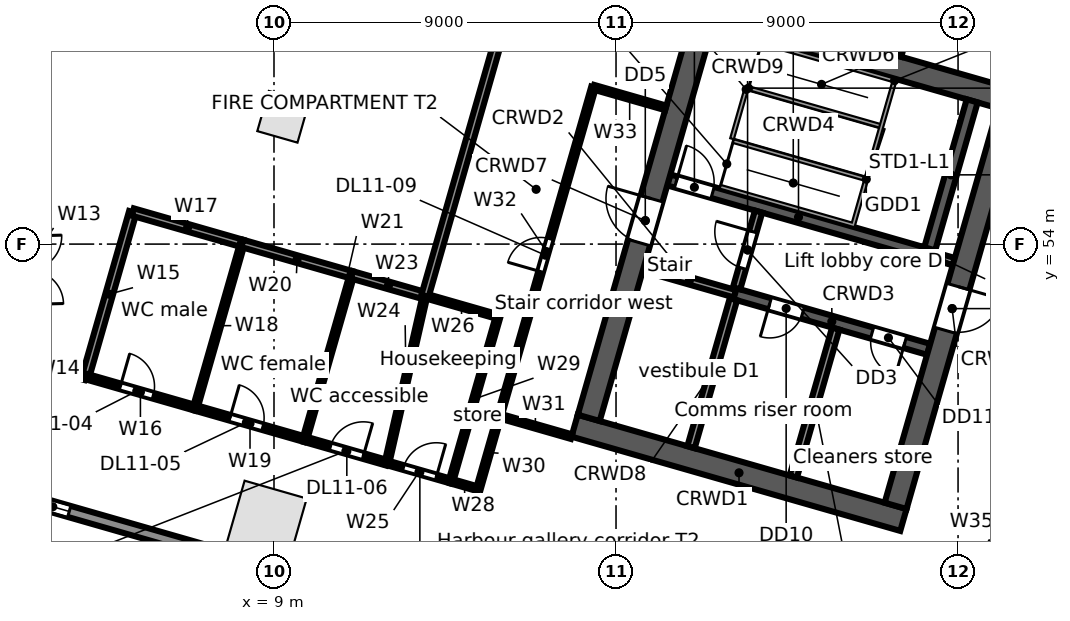
"""IFC4 building model, lengths in metres.
Left out: names, types, materials, properties, quantities, classifications, styles, units other than length and angle.
Written with IfcOpenShell. Run it as: python <this file> out.ifc"""

import sys

from ifc_helpers import new_model, si_unit, direction, frame, frame_2d, origin, origin_2d, place, context, subcontext, project, spatial, rectangle, extrude, element, fill, save


model = new_model("IFC4")
c1 = context("Model", 3, precision=1e-05, world=origin(), true_north=direction((0.0, 1.0)))
c2 = subcontext(c1, "Body", "Model", "MODEL_VIEW")
j1 = project(units=[si_unit("LENGTHUNIT", "METRE"), si_unit("PLANEANGLEUNIT", "RADIAN")], contexts=[c1])
p1 = place(None, origin())
s1 = spatial("IfcSite", under=j1, at=p1, CompositionType="ELEMENT")
p2 = place(p1, origin())
s2 = spatial("IfcBuilding", under=s1, at=p2, CompositionType="ELEMENT")
p3 = place(p2, frame((0.0, 0.0, 66.5)))
s3 = spatial("IfcBuildingStorey", under=s2, at=p3, CompositionType="ELEMENT", Elevation=66.5)
p4 = place(p3, frame((8.81, 46.722, 0.0), z_axis=(0.0, 0.0, 1.0), x_axis=(0.961261695938, -0.275637355817, 0.0)))
e1 = element("IfcColumn", 1, at=p4, inside=s3, PredefinedType="COLUMN", context=c2, shape_type="SweptSolid", body=[
    extrude(rectangle(XDim=1.7, YDim=1.7, at=origin_2d()), origin(), (0.0, 0.0, 1.0), 5.0),
])
p5 = place(p3, frame((9.241, 57.35, 0.0), z_axis=(0.0, 0.0, 1.0), x_axis=(0.961261695938, -0.275637355817, 0.0)))
e2 = element("IfcColumn", 2, at=p5, inside=s3, PredefinedType="COLUMN", context=c2, shape_type="SweptSolid", body=[
    extrude(rectangle(XDim=1.1, YDim=1.1, at=origin_2d()), origin(), (0.0, 0.0, 1.0), 5.0),
])
p6 = place(p3, frame((25.398, 40.717, 0.0), z_axis=(0.0, 0.0, 1.0), x_axis=(-0.961262423262, 0.275634819324, 0.0)))
e3 = element("IfcWall", 3, at=p6, inside=s3, PredefinedType="STANDARD", context=c2, shape_type="SweptSolid", body=[
    extrude(rectangle(XDim=26.359, YDim=0.3, at=frame_2d((13.179, 0.0))), origin(), (0.0, 0.0, 1.0), 4.68),
])
p7 = place(p6, frame((22.664, 0.0, 0.6)))
e4 = element("IfcOpeningElement", 4, at=p7, cuts=e3, PredefinedType="OPENING", context=c2, shape_type="SweptSolid", body=[
    extrude(rectangle(XDim=0.9, YDim=3.2, at=frame_2d((0.45, 1.6))), frame((0.0, 0.16, 0.0), z_axis=(0.0, -1.0, 0.0), x_axis=(1.0, 0.0, 0.0)), (0.0, 0.0, 1.0), 0.32),
])
p8 = place(p6, frame((13.844, 0.0, 0.6)))
e5 = element("IfcOpeningElement", 5, at=p8, cuts=e3, PredefinedType="OPENING", context=c2, shape_type="SweptSolid", body=[
    extrude(rectangle(XDim=0.9, YDim=3.2, at=frame_2d((0.45, 1.6))), frame((0.0, 0.16, 0.0), z_axis=(0.0, -1.0, 0.0), x_axis=(1.0, 0.0, 0.0)), (0.0, 0.0, 1.0), 0.32),
])
p9 = place(p6, frame((5.023, 0.0, 0.6)))
e6 = element("IfcOpeningElement", 6, at=p9, cuts=e3, PredefinedType="OPENING", context=c2, shape_type="SweptSolid", body=[
    extrude(rectangle(XDim=0.9, YDim=3.2, at=frame_2d((0.45, 1.6))), frame((0.0, 0.16, 0.0), z_axis=(0.0, -1.0, 0.0), x_axis=(1.0, 0.0, 0.0)), (0.0, 0.0, 1.0), 0.32),
])
p10 = place(p3, frame((16.911, 49.221, 0.0), z_axis=(0.0, 0.0, 1.0), x_axis=(0.96126248289, -0.275634611374, 0.0)))
e7 = element("IfcWall", 7, at=p10, inside=s3, PredefinedType="SOLIDWALL", context=c2, shape_type="SweptSolid", body=[
    extrude(rectangle(XDim=9.0, YDim=0.6, at=frame_2d((4.5, 0.0))), origin(), (0.0, 0.0, 1.0), 4.68),
])
p11 = place(p3, frame((18.728, 53.382, 0.0), z_axis=(0.0, 0.0, 1.0), x_axis=(0.961247070632, -0.275688355216, 0.0)))
e8 = element("IfcWall", 8, at=p11, inside=s3, PredefinedType="SOLIDWALL", context=c2, shape_type="SweptSolid", body=[
    extrude(rectangle(XDim=2.5, YDim=0.2, at=frame_2d((1.25, 0.0))), origin(), (0.0, 0.0, 1.0), 4.68),
])
p12 = place(p3, frame((21.131, 52.692, 0.0), z_axis=(0.0, 0.0, 1.0), x_axis=(0.961271492568, -0.275603188616, 0.0)))
e9 = element("IfcWall", 9, at=p12, inside=s3, PredefinedType="SOLIDWALL", context=c2, shape_type="SweptSolid", body=[
    extrude(rectangle(XDim=5.3, YDim=0.3, at=frame_2d((2.65, 0.0))), origin(), (0.0, 0.0, 1.0), 4.68),
])
p13 = place(p12, frame((0.95, 0.0, 0.0)))
e10 = element("IfcOpeningElement", 10, at=p13, cuts=e9, PredefinedType="OPENING", context=c2, shape_type="SweptSolid", body=[
    extrude(rectangle(XDim=0.9, YDim=2.1, at=frame_2d((0.45, 1.05))), frame((0.0, 0.16, 0.0), z_axis=(0.0, -1.0, 0.0), x_axis=(1.0, 0.0, 0.0)), (0.0, 0.0, 1.0), 0.32),
])
p14 = place(p12, frame((3.75, 0.0, 0.0)))
e11 = element("IfcOpeningElement", 11, at=p14, cuts=e9, PredefinedType="OPENING", context=c2, shape_type="SweptSolid", body=[
    extrude(rectangle(XDim=0.9, YDim=2.1, at=frame_2d((0.45, 1.05))), frame((0.0, 0.16, 0.0), z_axis=(0.0, -1.0, 0.0), x_axis=(1.0, 0.0, 0.0)), (0.0, 0.0, 1.0), 0.32),
])
p15 = place(p3, frame((19.389, 55.689, 0.0), z_axis=(0.0, 0.0, 1.0), x_axis=(0.961261397636, -0.275638396117, 0.0)))
e12 = element("IfcWall", 12, at=p15, inside=s3, PredefinedType="SOLIDWALL", context=c2, shape_type="SweptSolid", body=[
    extrude(rectangle(XDim=7.1, YDim=0.3, at=frame_2d((3.55, 0.0))), origin(), (0.0, 0.0, 1.0), 4.68),
])
p16 = place(p15, frame((0.2, 0.0, 0.0)))
e13 = element("IfcOpeningElement", 13, at=p16, cuts=e12, PredefinedType="OPENING", context=c2, shape_type="SweptSolid", body=[
    extrude(rectangle(XDim=1.0, YDim=2.1, at=frame_2d((0.5, 1.05))), frame((0.0, 0.16, 0.0), z_axis=(0.0, -1.0, 0.0), x_axis=(1.0, 0.0, 0.0)), (0.0, 0.0, 1.0), 0.32),
])
p17 = place(p3, frame((26.214, 53.732, 0.0), z_axis=(0.0, 0.0, 1.0), x_axis=(0.96122076476, -0.27578005982, 0.0)))
e14 = element("IfcWall", 14, at=p17, inside=s3, PredefinedType="SOLIDWALL", context=c2, shape_type="SweptSolid", body=[
    extrude(rectangle(XDim=0.7, YDim=0.2, at=frame_2d((0.35, 0.0))), origin(), (0.0, 0.0, 1.0), 4.68),
])
p18 = place(p3, frame((20.053, 60.18, 0.0), z_axis=(0.0, 0.0, 1.0), x_axis=(0.96126248289, -0.275634611374, 0.0)))
e15 = element("IfcWall", 15, at=p18, inside=s3, PredefinedType="SOLIDWALL", context=c2, shape_type="SweptSolid", body=[
    extrude(rectangle(XDim=9.0, YDim=0.6, at=frame_2d((4.5, 0.0))), origin(), (0.0, 0.0, 1.0), 4.68),
])
p19 = place(p3, frame((17.282, 49.427, 0.0), z_axis=(0.0, 0.0, 1.0), x_axis=(0.275631631629, 0.961263337304, 0.0)))
e16 = element("IfcWall", 16, at=p19, inside=s3, PredefinedType="SOLIDWALL", context=c2, shape_type="SweptSolid", body=[
    extrude(rectangle(XDim=10.8, YDim=0.6, at=frame_2d((5.4, 0.0))), origin(), (0.0, 0.0, 1.0), 4.68),
])
p20 = place(p19, frame((4.8, 0.0, 0.0)))
e17 = element("IfcOpeningElement", 17, at=p20, cuts=e16, PredefinedType="OPENING", context=c2, shape_type="SweptSolid", body=[
    extrude(rectangle(XDim=1.2, YDim=2.1, at=frame_2d((0.6, 1.05))), frame((0.0, 0.31, 0.0), z_axis=(0.0, -1.0, 0.0), x_axis=(1.0, 0.0, 0.0)), (0.0, 0.0, 1.0), 0.62),
])
p21 = place(p3, frame((19.973, 48.655, 0.0), z_axis=(0.0, 0.0, 1.0), x_axis=(0.275668441653, 0.961252781674, 0.0)))
e18 = element("IfcWall", 18, at=p21, inside=s3, PredefinedType="SOLIDWALL", context=c2, shape_type="SweptSolid", body=[
    extrude(rectangle(XDim=4.05, YDim=0.2, at=frame_2d((2.025, 0.0))), origin(), (0.0, 0.0, 1.0), 4.68),
])
p22 = place(p3, frame((21.172, 52.837, 0.0), z_axis=(0.0, 0.0, 1.0), x_axis=(0.275657676022, 0.961255868981, 0.0)))
e19 = element("IfcWall", 19, at=p22, inside=s3, PredefinedType="PARTITIONING", context=c2, shape_type="SweptSolid", body=[
    extrude(rectangle(XDim=2.1, YDim=0.2, at=frame_2d((1.05, 0.0))), origin(), (0.0, 0.0, 1.0), 4.68),
])
p23 = place(p22, frame((0.55, 0.0, 0.0)))
e20 = element("IfcOpeningElement", 20, at=p23, cuts=e19, PredefinedType="OPENING", context=c2, shape_type="SweptSolid", body=[
    extrude(rectangle(XDim=1.0, YDim=2.1, at=frame_2d((0.5, 1.05))), frame((0.0, 0.11, 0.0), z_axis=(0.0, -1.0, 0.0), x_axis=(1.0, 0.0, 0.0)), (0.0, 0.0, 1.0), 0.22),
])
p24 = place(p3, frame((22.665, 47.883, 0.0), z_axis=(0.0, 0.0, 1.0), x_axis=(0.275596769212, 0.961273333033, 0.0)))
e21 = element("IfcWall", 21, at=p24, inside=s3, PredefinedType="PARTITIONING", context=c2, shape_type="SweptSolid", body=[
    extrude(rectangle(XDim=4.05, YDim=0.2, at=frame_2d((2.025, 0.0))), origin(), (0.0, 0.0, 1.0), 4.68),
])
p25 = place(p3, frame((26.256, 53.876, 0.0), z_axis=(0.0, 0.0, 1.0), x_axis=(0.275612739511, 0.961268754209, 0.0)))
e22 = element("IfcWall", 22, at=p25, inside=s3, PredefinedType="SOLIDWALL", context=c2, shape_type="SweptSolid", body=[
    extrude(rectangle(XDim=4.05, YDim=0.3, at=frame_2d((2.025, 0.0))), origin(), (0.0, 0.0, 1.0), 4.68),
])
p26 = place(p3, frame((25.356, 47.112, 0.0), z_axis=(0.0, 0.0, 1.0), x_axis=(0.275631631629, 0.961263337304, 0.0)))
e23 = element("IfcWall", 23, at=p26, inside=s3, PredefinedType="SOLIDWALL", context=c2, shape_type="SweptSolid", body=[
    extrude(rectangle(XDim=10.8, YDim=0.6, at=frame_2d((5.4, 0.0))), origin(), (0.0, 0.0, 1.0), 4.68),
])
p27 = place(p26, frame((4.8, 0.0, 0.0)))
e24 = element("IfcOpeningElement", 24, at=p27, cuts=e23, PredefinedType="OPENING", context=c2, shape_type="SweptSolid", body=[
    extrude(rectangle(XDim=1.2, YDim=2.1, at=frame_2d((0.6, 1.05))), frame((0.0, 0.31, 0.0), z_axis=(0.0, -1.0, 0.0), x_axis=(1.0, 0.0, 0.0)), (0.0, 0.0, 1.0), 0.62),
])
p28 = place(p3, frame((2.601, 50.932, 0.0), z_axis=(0.0, 0.0, 1.0), x_axis=(0.961197773994, -0.27586018065, 0.0)))
e25 = element("IfcWall", 25, at=p28, inside=s3, PredefinedType="PARTITIONING", context=c2, shape_type="SweptSolid", body=[
    extrude(rectangle(XDim=1.5, YDim=0.2, at=frame_2d((0.75, 0.0))), origin(), (0.0, 0.0, 1.0), 4.68),
])
p29 = place(p3, frame((4.043, 50.518, 0.0), z_axis=(0.0, 0.0, 1.0), x_axis=(0.275745553681, 0.96123066411, 0.0)))
e26 = element("IfcWall", 26, at=p29, inside=s3, PredefinedType="PARTITIONING", context=c2, shape_type="SweptSolid", body=[
    extrude(rectangle(XDim=4.5, YDim=0.2, at=frame_2d((2.25, 0.0))), origin(), (0.0, 0.0, 1.0), 4.68),
])
p30 = place(p3, frame((4.043, 50.518, 0.0), z_axis=(0.0, 0.0, 1.0), x_axis=(0.961247103494, -0.275688240636, 0.0)))
e27 = element("IfcWall", 27, at=p30, inside=s3, PredefinedType="PARTITIONING", context=c2, shape_type="SweptSolid", body=[
    extrude(rectangle(XDim=3.0, YDim=0.15, at=frame_2d((1.5, 0.0))), origin(), (0.0, 0.0, 1.0), 4.68),
])
p31 = place(p30, frame((0.95, 0.0, 0.0)))
e28 = element("IfcOpeningElement", 28, at=p31, cuts=e27, PredefinedType="OPENING", context=c2, shape_type="SweptSolid", body=[
    extrude(rectangle(XDim=0.9, YDim=2.1, at=frame_2d((0.45, 1.05))), frame((0.0, 0.085, 0.0), z_axis=(0.0, -1.0, 0.0), x_axis=(1.0, 0.0, 0.0)), (0.0, 0.0, 1.0), 0.17),
])
p32 = place(p3, frame((5.284, 54.844, 0.0), z_axis=(0.0, 0.0, 1.0), x_axis=(0.961243927922, -0.275699312717, 0.0)))
e29 = element("IfcWall", 29, at=p32, inside=s3, PredefinedType="PARTITIONING", context=c2, shape_type="SweptSolid", body=[
    extrude(rectangle(XDim=2.999, YDim=0.2, at=frame_2d((1.5, 0.0))), origin(), (0.0, 0.0, 1.0), 4.68),
])
p33 = place(p3, frame((6.927, 49.691, 0.0), z_axis=(0.0, 0.0, 1.0), x_axis=(0.275530671241, 0.961292280841, 0.0)))
e30 = element("IfcWall", 30, at=p33, inside=s3, PredefinedType="PARTITIONING", context=c2, shape_type="SweptSolid", body=[
    extrude(rectangle(XDim=4.5, YDim=0.125, at=frame_2d((2.25, 0.0))), origin(), (0.0, 0.0, 1.0), 4.68),
])
p34 = place(p3, frame((6.927, 49.691, 0.0), z_axis=(0.0, 0.0, 1.0), x_axis=(0.961268664977, -0.27561305073, 0.0)))
e31 = element("IfcWall", 31, at=p34, inside=s3, PredefinedType="PARTITIONING", context=c2, shape_type="SweptSolid", body=[
    extrude(rectangle(XDim=3.0, YDim=0.15, at=frame_2d((1.5, 0.0))), origin(), (0.0, 0.0, 1.0), 3.742),
])
p35 = place(p34, frame((0.95, 0.0, 0.0)))
e32 = element("IfcOpeningElement", 32, at=p35, cuts=e31, PredefinedType="OPENING", context=c2, shape_type="SweptSolid", body=[
    extrude(rectangle(XDim=0.9, YDim=2.1, at=frame_2d((0.45, 1.05))), frame((0.0, 0.085, 0.0), z_axis=(0.0, -1.0, 0.0), x_axis=(1.0, 0.0, 0.0)), (0.0, 0.0, 1.0), 0.17),
])
p36 = place(p3, frame((8.167, 54.017, 0.0), z_axis=(0.0, 0.0, 1.0), x_axis=(0.961247103494, -0.275688240636, 0.0)))
e33 = element("IfcWall", 33, at=p36, inside=s3, PredefinedType="PARTITIONING", context=c2, shape_type="SweptSolid", body=[
    extrude(rectangle(XDim=3.0, YDim=0.2, at=frame_2d((1.5, 0.0))), origin(), (0.0, 0.0, 1.0), 3.742),
])
p37 = place(p3, frame((9.811, 48.864, 0.0), z_axis=(0.0, 0.0, 1.0), x_axis=(0.275545040649, 0.96128816209, 0.0)))
e34 = element("IfcWall", 34, at=p37, inside=s3, PredefinedType="PARTITIONING", context=c2, shape_type="SweptSolid", body=[
    extrude(rectangle(XDim=4.5, YDim=0.125, at=frame_2d((2.25, 0.0))), origin(), (0.0, 0.0, 1.0), 4.68),
])
p38 = place(p3, frame((9.811, 48.864, 0.0), z_axis=(0.0, 0.0, 1.0), x_axis=(0.961236680145, -0.275724581318, 0.0)))
e35 = element("IfcWall", 35, at=p38, inside=s3, PredefinedType="PARTITIONING", context=c2, shape_type="SweptSolid", body=[
    extrude(rectangle(XDim=2.249, YDim=0.15, at=frame_2d((1.125, 0.0))), origin(), (0.0, 0.0, 1.0), 4.68),
])
p39 = place(p38, frame((0.7, 0.0, 0.0)))
e36 = element("IfcOpeningElement", 36, at=p39, cuts=e35, PredefinedType="OPENING", context=c2, shape_type="SweptSolid", body=[
    extrude(rectangle(XDim=0.9, YDim=2.1, at=frame_2d((0.45, 1.05))), frame((0.0, 0.085, 0.0), z_axis=(0.0, -1.0, 0.0), x_axis=(1.0, 0.0, 0.0)), (0.0, 0.0, 1.0), 0.17),
])
p40 = place(p3, frame((11.051, 53.19, 0.0), z_axis=(0.0, 0.0, 1.0), x_axis=(0.961316434736, -0.275446387355, 0.0)))
e37 = element("IfcWall", 37, at=p40, inside=s3, PredefinedType="PARTITIONING", context=c2, shape_type="SweptSolid", body=[
    extrude(rectangle(XDim=2.0, YDim=0.2, at=frame_2d((1.0, 0.0))), origin(), (0.0, 0.0, 1.0), 4.68),
])
p41 = place(p3, frame((11.973, 48.244, 0.0), z_axis=(0.0, 0.0, 1.0), x_axis=(0.222117362571, 0.975019936845, 0.0)))
e38 = element("IfcWall", 38, at=p41, inside=s3, PredefinedType="PARTITIONING", context=c2, shape_type="SweptSolid", body=[
    extrude(rectangle(XDim=4.508, YDim=0.125, at=frame_2d((2.254, 0.0))), origin(), (0.0, 0.0, 1.0), 4.68),
])
p42 = place(p3, frame((11.973, 48.244, 0.0), z_axis=(0.0, 0.0, 1.0), x_axis=(0.96136592135, -0.275273618907, 0.0)))
e39 = element("IfcWall", 39, at=p42, inside=s3, PredefinedType="PARTITIONING", context=c2, shape_type="SweptSolid", body=[
    extrude(rectangle(XDim=1.751, YDim=0.125, at=frame_2d((0.875, 0.0))), origin(), (0.0, 0.0, 1.0), 4.68),
])
p43 = place(p42, frame((0.45, 0.0, 0.0)))
e40 = element("IfcOpeningElement", 40, at=p43, cuts=e39, PredefinedType="OPENING", context=c2, shape_type="SweptSolid", body=[
    extrude(rectangle(XDim=0.9, YDim=2.1, at=frame_2d((0.45, 1.05))), frame((0.0, 0.073, 0.0), z_axis=(0.0, -1.0, 0.0), x_axis=(1.0, 0.0, 0.0)), (0.0, 0.0, 1.0), 0.145),
])
p44 = place(p3, frame((12.974, 52.639, 0.0), z_axis=(0.0, 0.0, 1.0), x_axis=(0.961270097305, -0.275608055084, 0.0)))
e41 = element("IfcWall", 41, at=p44, inside=s3, PredefinedType="PARTITIONING", context=c2, shape_type="SweptSolid", body=[
    extrude(rectangle(XDim=1.999, YDim=0.125, at=frame_2d((1.0, 0.0))), origin(), (0.0, 0.0, 1.0), 4.68),
])
p45 = place(p3, frame((12.974, 52.639, 0.0), z_axis=(0.0, 0.0, 1.0), x_axis=(0.275299463768, 0.961358520662, 0.0)))
e42 = element("IfcWall", 42, at=p45, inside=s3, PredefinedType="PARTITIONING", context=c2, shape_type="SweptSolid", body=[
    extrude(rectangle(XDim=14.885, YDim=0.2, at=frame_2d((7.443, 0.0))), origin(), (0.0, 0.0, 1.0), 3.742),
])
p46 = place(p3, frame((13.656, 47.762, 0.0), z_axis=(0.0, 0.0, 1.0), x_axis=(0.961154610169, -0.276010534854, 0.0)))
e43 = element("IfcWall", 43, at=p46, inside=s3, PredefinedType="PARTITIONING", context=c2, shape_type="SweptSolid", body=[
    extrude(rectangle(XDim=0.75, YDim=0.125, at=frame_2d((0.375, 0.0))), origin(), (0.0, 0.0, 1.0), 4.68),
])
p47 = place(p3, frame((13.656, 47.762, 0.0), z_axis=(0.0, 0.0, 1.0), x_axis=(0.275545040649, 0.96128816209, 0.0)))
e44 = element("IfcWall", 44, at=p47, inside=s3, PredefinedType="PARTITIONING", context=c2, shape_type="SweptSolid", body=[
    extrude(rectangle(XDim=4.5, YDim=0.125, at=frame_2d((2.25, 0.0))), origin(), (0.0, 0.0, 1.0), 4.68),
])
p48 = place(p3, frame((14.377, 47.555, 0.0), z_axis=(0.0, 0.0, 1.0), x_axis=(0.275446387355, 0.961316434736, 0.0)))
e45 = element("IfcWall", 45, at=p48, inside=s3, PredefinedType="PARTITIONING", context=c2, shape_type="SweptSolid", body=[
    extrude(rectangle(XDim=2.0, YDim=0.125, at=frame_2d((1.0, 0.0))), origin(), (0.0, 0.0, 1.0), 4.68),
])
p49 = place(p3, frame((14.928, 49.478, 0.0), z_axis=(0.0, 0.0, 1.0), x_axis=(0.961243778232, -0.27569983462, 0.0)))
e46 = element("IfcWall", 46, at=p49, inside=s3, PredefinedType="PARTITIONING", context=c2, shape_type="SweptSolid", body=[
    extrude(rectangle(XDim=1.977, YDim=0.125, at=frame_2d((0.988, 0.0))), origin(), (0.0, 0.0, 1.0), 4.68),
])
p50 = place(p3, frame((14.928, 49.478, 0.0), z_axis=(0.0, 0.0, 1.0), x_axis=(0.275674053528, 0.961251172281, 0.0)))
e47 = element("IfcWall", 47, at=p50, inside=s3, PredefinedType="PARTITIONING", context=c2, shape_type="SweptSolid", body=[
    extrude(rectangle(XDim=9.0, YDim=0.125, at=frame_2d((4.5, 0.0))), origin(), (0.0, 0.0, 1.0), 3.742),
])
p51 = place(p50, frame((3.95, 0.0, 0.0)))
e48 = element("IfcOpeningElement", 48, at=p51, cuts=e47, PredefinedType="OPENING", context=c2, shape_type="SweptSolid", body=[
    extrude(rectangle(XDim=0.9, YDim=2.1, at=frame_2d((0.45, 1.05))), frame((0.0, 0.073, 0.0), z_axis=(0.0, -1.0, 0.0), x_axis=(1.0, 0.0, 0.0)), (0.0, 0.0, 1.0), 0.145),
])
p52 = place(p3, frame((17.409, 58.129, 0.0), z_axis=(0.0, 0.0, 1.0), x_axis=(0.961253165474, -0.275667103345, 0.0)))
e49 = element("IfcWall", 49, at=p52, inside=s3, PredefinedType="PARTITIONING", context=c2, shape_type="SweptSolid", body=[
    extrude(rectangle(XDim=1.977, YDim=0.125, at=frame_2d((0.988, 0.0))), origin(), (0.0, 0.0, 1.0), 4.68),
])
p53 = place(p3, frame((25.445, 58.946, 0.0), z_axis=(0.0, 0.0, 1.0), x_axis=(0.268850353538, 0.963181959654, 0.0)))
e50 = element("IfcWall", 50, at=p53, inside=s3, PredefinedType="PARTITIONING", context=c2, shape_type="SweptSolid", body=[
    extrude(rectangle(XDim=3.485, YDim=0.125, at=frame_2d((1.743, 0.0))), origin(), (0.0, 0.0, 1.0), 4.154),
])
p54 = place(p3, frame((26.456, 42.338, 0.0), z_axis=(0.0, 0.0, 1.0), x_axis=(0.52980027265, 0.848122438743, 0.0)))
e51 = element("IfcWall", 51, at=p54, inside=s3, PredefinedType="PARTITIONING", context=c2, shape_type="SweptSolid", body=[
    extrude(rectangle(XDim=6.076, YDim=0.25, at=frame_2d((3.038, 0.0))), origin(), (0.0, 0.0, 1.0), 4.68),
])
p55 = place(p54, frame((2.2, 0.0, 0.0)))
e52 = element("IfcOpeningElement", 52, at=p55, cuts=e51, PredefinedType="OPENING", context=c2, shape_type="SweptSolid", body=[
    extrude(rectangle(XDim=1.8, YDim=2.1, at=frame_2d((0.9, 1.05))), frame((0.0, 0.135, 0.0), z_axis=(0.0, -1.0, 0.0), x_axis=(1.0, 0.0, 0.0)), (0.0, 0.0, 1.0), 0.27),
])
p56 = place(p7, origin())
e53 = element("IfcWindow", 53, at=p56, inside=s3, PartitioningType="SINGLE_PANEL", PredefinedType="WINDOW", context=c2, shape_type="SweptSolid", body=[
    extrude(rectangle(XDim=0.9, YDim=3.2, at=frame_2d((0.45, 1.6))), frame((0.0, 0.03, 0.0), z_axis=(0.0, -1.0, 0.0), x_axis=(1.0, 0.0, 0.0)), (0.0, 0.0, 1.0), 0.06),
])
fill(e4, e53)
p57 = place(p16, origin())
e54 = element("IfcDoor", 54, at=p57, inside=s3, OperationType="SINGLE_SWING_LEFT", PredefinedType="DOOR", context=c2, shape_type="SweptSolid", body=[
    extrude(rectangle(XDim=1.0, YDim=2.1, at=frame_2d((0.5, 1.05))), frame((0.0, 0.025, 0.0), z_axis=(0.0, -1.0, 0.0), x_axis=(1.0, 0.0, 0.0)), (0.0, 0.0, 1.0), 0.05),
])
fill(e13, e54)
p58 = place(p23, origin())
e55 = element("IfcDoor", 55, at=p58, inside=s3, OperationType="SINGLE_SWING_RIGHT", PredefinedType="DOOR", context=c2, shape_type="SweptSolid", body=[
    extrude(rectangle(XDim=1.0, YDim=2.1, at=frame_2d((0.5, 1.05))), frame((0.0, 0.025, 0.0), z_axis=(0.0, -1.0, 0.0), x_axis=(1.0, 0.0, 0.0)), (0.0, 0.0, 1.0), 0.05),
])
fill(e20, e55)
p59 = place(p20, origin())
e56 = element("IfcDoor", 56, at=p59, inside=s3, OperationType="SINGLE_SWING_RIGHT", PredefinedType="DOOR", context=c2, shape_type="SweptSolid", body=[
    extrude(rectangle(XDim=1.2, YDim=2.1, at=frame_2d((0.6, 1.05))), frame((0.0, 0.025, 0.0), z_axis=(0.0, -1.0, 0.0), x_axis=(1.0, 0.0, 0.0)), (0.0, 0.0, 1.0), 0.05),
])
fill(e17, e56)
p60 = place(p27, frame((1.2, 0.0, 0.0), z_axis=(0.0, 0.0, 1.0), x_axis=(-1.0, 0.0, 0.0)))
e57 = element("IfcDoor", 57, at=p60, inside=s3, OperationType="SINGLE_SWING_LEFT", PredefinedType="DOOR", context=c2, shape_type="SweptSolid", body=[
    extrude(rectangle(XDim=1.2, YDim=2.1, at=frame_2d((0.6, 1.05))), frame((0.0, 0.025, 0.0), z_axis=(0.0, -1.0, 0.0), x_axis=(1.0, 0.0, 0.0)), (0.0, 0.0, 1.0), 0.05),
])
fill(e24, e57)
p61 = place(p13, frame((0.9, 0.0, 0.0), z_axis=(0.0, 0.0, 1.0), x_axis=(-1.0, 0.0, 0.0)))
e58 = element("IfcDoor", 58, at=p61, inside=s3, OperationType="SINGLE_SWING_RIGHT", PredefinedType="DOOR", context=c2, shape_type="SweptSolid", body=[
    extrude(rectangle(XDim=0.9, YDim=2.1, at=frame_2d((0.45, 1.05))), frame((0.0, 0.025, 0.0), z_axis=(0.0, -1.0, 0.0), x_axis=(1.0, 0.0, 0.0)), (0.0, 0.0, 1.0), 0.05),
])
fill(e10, e58)
p62 = place(p14, frame((0.9, 0.0, 0.0), z_axis=(0.0, 0.0, 1.0), x_axis=(-1.0, 0.0, 0.0)))
e59 = element("IfcDoor", 59, at=p62, inside=s3, OperationType="SINGLE_SWING_LEFT", PredefinedType="DOOR", context=c2, shape_type="SweptSolid", body=[
    extrude(rectangle(XDim=0.9, YDim=2.1, at=frame_2d((0.45, 1.05))), frame((0.0, 0.025, 0.0), z_axis=(0.0, -1.0, 0.0), x_axis=(1.0, 0.0, 0.0)), (0.0, 0.0, 1.0), 0.05),
])
fill(e11, e59)
p63 = place(p31, origin())
e60 = element("IfcDoor", 60, at=p63, inside=s3, OperationType="SINGLE_SWING_LEFT", PredefinedType="DOOR", context=c2, shape_type="SweptSolid", body=[
    extrude(rectangle(XDim=0.9, YDim=2.1, at=frame_2d((0.45, 1.05))), frame((0.0, 0.025, 0.0), z_axis=(0.0, -1.0, 0.0), x_axis=(1.0, 0.0, 0.0)), (0.0, 0.0, 1.0), 0.05),
])
fill(e28, e60)
p64 = place(p35, origin())
e61 = element("IfcDoor", 61, at=p64, inside=s3, OperationType="SINGLE_SWING_LEFT", PredefinedType="DOOR", context=c2, shape_type="SweptSolid", body=[
    extrude(rectangle(XDim=0.9, YDim=2.1, at=frame_2d((0.45, 1.05))), frame((0.0, 0.025, 0.0), z_axis=(0.0, -1.0, 0.0), x_axis=(1.0, 0.0, 0.0)), (0.0, 0.0, 1.0), 0.05),
])
fill(e32, e61)
p65 = place(p39, origin())
e62 = element("IfcDoor", 62, at=p65, inside=s3, OperationType="SINGLE_SWING_RIGHT", PredefinedType="DOOR", context=c2, shape_type="SweptSolid", body=[
    extrude(rectangle(XDim=0.9, YDim=2.1, at=frame_2d((0.45, 1.05))), frame((0.0, 0.025, 0.0), z_axis=(0.0, -1.0, 0.0), x_axis=(1.0, 0.0, 0.0)), (0.0, 0.0, 1.0), 0.05),
])
fill(e36, e62)
p66 = place(p43, origin())
e63 = element("IfcDoor", 63, at=p66, inside=s3, OperationType="SINGLE_SWING_RIGHT", PredefinedType="DOOR", context=c2, shape_type="SweptSolid", body=[
    extrude(rectangle(XDim=0.9, YDim=2.1, at=frame_2d((0.45, 1.05))), frame((0.0, 0.025, 0.0), z_axis=(0.0, -1.0, 0.0), x_axis=(1.0, 0.0, 0.0)), (0.0, 0.0, 1.0), 0.05),
])
fill(e40, e63)
p67 = place(p51, origin())
e64 = element("IfcDoor", 64, at=p67, inside=s3, OperationType="SINGLE_SWING_LEFT", PredefinedType="DOOR", context=c2, shape_type="SweptSolid", body=[
    extrude(rectangle(XDim=0.9, YDim=2.1, at=frame_2d((0.45, 1.05))), frame((0.0, 0.025, 0.0), z_axis=(0.0, -1.0, 0.0), x_axis=(1.0, 0.0, 0.0)), (0.0, 0.0, 1.0), 0.05),
])
fill(e48, e64)
save(model, sys.argv[1])
